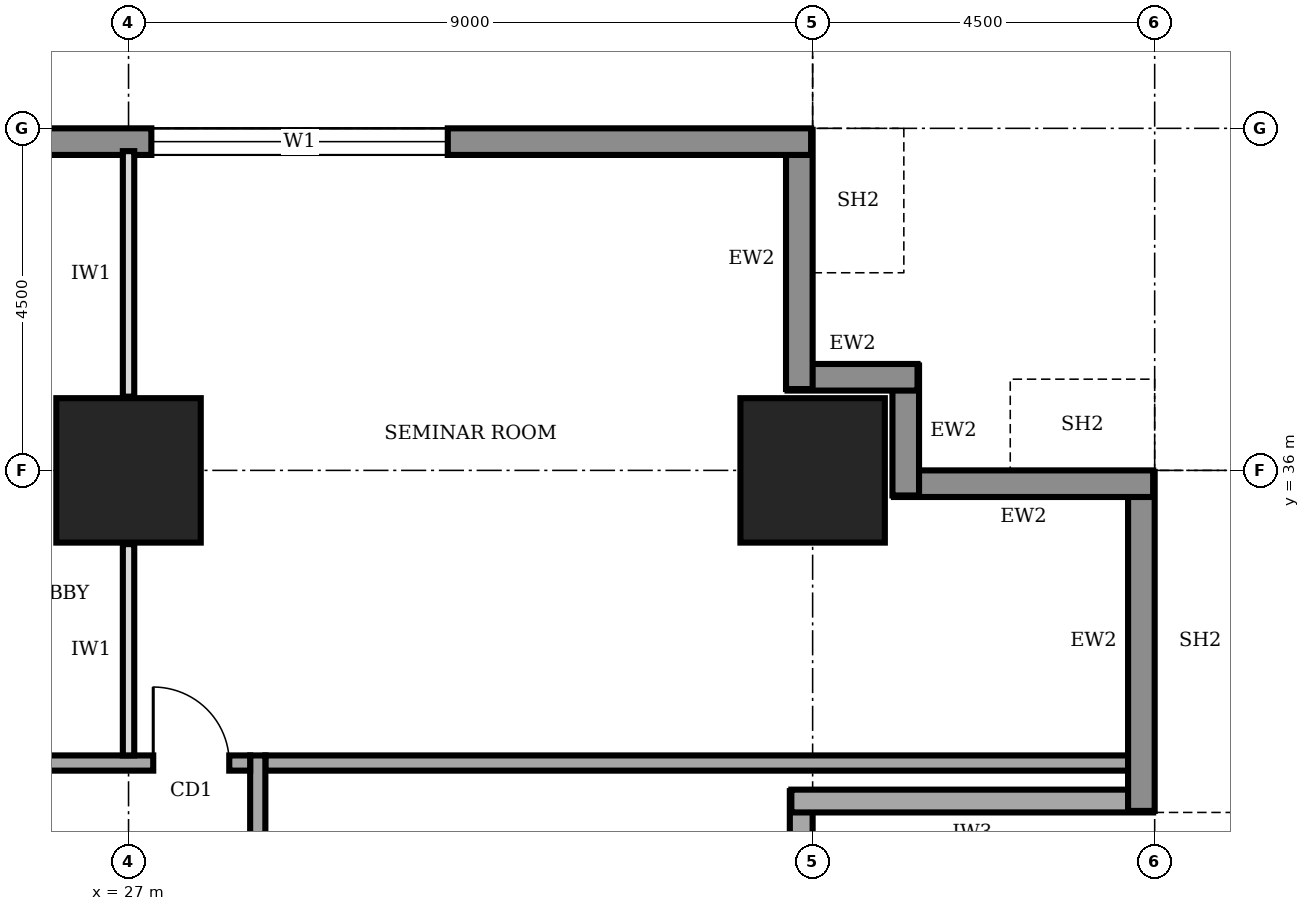
"""IFC4 building model, lengths in metres.
Left out: names, types, materials, properties, quantities, classifications, styles, units other than length and angle.
Written with IfcOpenShell. Run it as: python <this file> out.ifc"""

import sys

from ifc_helpers import new_model, si_unit, direction, frame, frame_2d, origin, origin_2d, place, context, subcontext, project, spatial, rectangle, extrude, element, fill, save


model = new_model("IFC4")
c1 = context("Model", 3, precision=1e-05, world=origin(), true_north=direction((0.0, 1.0)))
c2 = subcontext(c1, "Body", "Model", "MODEL_VIEW")
j1 = project(units=[si_unit("LENGTHUNIT", "METRE"), si_unit("PLANEANGLEUNIT", "RADIAN")], contexts=[c1])
p1 = place(None, origin())
s1 = spatial("IfcSite", under=j1, at=p1, CompositionType="ELEMENT")
p2 = place(p1, origin())
s2 = spatial("IfcBuilding", under=s1, at=p2, CompositionType="ELEMENT")
p3 = place(p2, frame((0.0, 0.0, 109.0)))
s3 = spatial("IfcBuildingStorey", under=s2, at=p3, CompositionType="ELEMENT", Elevation=109.0)
for number, where, z_axis, x_axis in (
    (1, (27.0, 36.0, 0.0), (0.0, 0.0, 1.0), (1.0, 0.0, 0.0)),
    (2, (36.0, 36.0, 0.0), (0.0, 0.0, 1.0), (1.0, 0.0, 0.0)),
):
    element("IfcColumn", number, at=place(p3, frame(where, z_axis=z_axis, x_axis=x_axis)), inside=s3, PredefinedType="COLUMN", context=c2, shape_type="SweptSolid", body=[
        extrude(rectangle(XDim=1.9, YDim=1.9, at=origin_2d()), origin(), (0.0, 0.0, 1.0), 4.0),
    ])
p4 = place(p3, frame((35.85, 30.4, 0.0), z_axis=(0.0, 0.0, 1.0), x_axis=(0.0, 1.0, 0.0)))
e3 = element("IfcWall", 3, at=p4, inside=s3, PredefinedType="SOLIDWALL", context=c2, shape_type="SweptSolid", body=[
    extrude(rectangle(XDim=1.38, YDim=0.3, at=frame_2d((0.69, 0.0))), origin(), (0.0, 0.0, 1.0), 2.65),
])
p5 = place(p3, frame((35.72, 31.65, 0.0), z_axis=(0.0, 0.0, 1.0), x_axis=(1.0, 0.0, 0.0)))
e4 = element("IfcWall", 4, at=p5, inside=s3, PredefinedType="SOLIDWALL", context=c2, shape_type="SweptSolid", body=[
    extrude(rectangle(XDim=4.76, YDim=0.3, at=frame_2d((2.38, 0.0))), origin(), (0.0, 0.0, 1.0), 3.75),
])
p6 = place(p3, frame((40.325, 31.52, 0.0), z_axis=(0.0, 0.0, 1.0), x_axis=(0.0, 1.0, 0.0)))
e5 = element("IfcWall", 5, at=p6, inside=s3, PredefinedType="STANDARD", context=c2, shape_type="SweptSolid", body=[
    extrude(rectangle(XDim=4.46, YDim=0.35, at=frame_2d((2.23, 0.0))), origin(), (0.0, 0.0, 1.0), 3.75),
])
p7 = place(p3, frame((40.48, 35.825, 0.0), z_axis=(0.0, 0.0, 1.0), x_axis=(-1.0, 0.0, 0.0)))
e6 = element("IfcWall", 6, at=p7, inside=s3, PredefinedType="STANDARD", context=c2, shape_type="SweptSolid", body=[
    extrude(rectangle(XDim=3.41, YDim=0.35, at=frame_2d((1.705, 0.0))), origin(), (0.0, 0.0, 1.0), 2.85),
])
for number, where, z_axis, x_axis in (
    (7, (37.225, 35.67, 0.0), (0.0, 0.0, 1.0), (0.0, 1.0, 0.0)),
    (8, (37.38, 37.225, 0.0), (0.0, 0.0, 1.0), (-1.0, 0.0, 0.0)),
):
    element("IfcWall", number, at=place(p3, frame(where, z_axis=z_axis, x_axis=x_axis)), inside=s3, PredefinedType="STANDARD", context=c2, shape_type="SweptSolid", body=[
        extrude(rectangle(XDim=1.71, YDim=0.35, at=frame_2d((0.855, 0.0))), origin(), (0.0, 0.0, 1.0), 3.75),
    ])
p8 = place(p3, frame((35.825, 37.07, 0.0), z_axis=(0.0, 0.0, 1.0), x_axis=(0.0, 1.0, 0.0)))
e9 = element("IfcWall", 9, at=p8, inside=s3, PredefinedType="STANDARD", context=c2, shape_type="SweptSolid", body=[
    extrude(rectangle(XDim=3.41, YDim=0.35, at=frame_2d((1.705, 0.0))), origin(), (0.0, 0.0, 1.0), 2.85),
])
p9 = place(p3, frame((35.98, 40.325, 0.0), z_axis=(0.0, 0.0, 1.0), x_axis=(-1.0, 0.0, 0.0)))
e10 = element("IfcWall", 10, at=p9, inside=s3, PredefinedType="STANDARD", context=c2, shape_type="SweptSolid", body=[
    extrude(rectangle(XDim=31.46, YDim=0.35, at=frame_2d((15.73, 0.0))), origin(), (0.0, 0.0, 1.0), 3.75),
])
p10 = place(p9, frame((27.21, 0.0, 0.9)))
e11 = element("IfcOpeningElement", 11, at=p10, cuts=e10, PredefinedType="OPENING", context=c2, shape_type="SweptSolid", body=[
    extrude(rectangle(XDim=3.9, YDim=2.2, at=frame_2d((1.95, 1.1))), frame((0.0, 0.185, 0.0), z_axis=(0.0, -1.0, 0.0), x_axis=(1.0, 0.0, 0.0)), (0.0, 0.0, 1.0), 0.37),
])
p11 = place(p9, frame((22.78, 0.0, 0.9)))
e12 = element("IfcOpeningElement", 12, at=p11, cuts=e10, PredefinedType="OPENING", context=c2, shape_type="SweptSolid", body=[
    extrude(rectangle(XDim=3.9, YDim=2.2, at=frame_2d((1.95, 1.1))), frame((0.0, 0.185, 0.0), z_axis=(0.0, -1.0, 0.0), x_axis=(1.0, 0.0, 0.0)), (0.0, 0.0, 1.0), 0.37),
])
p12 = place(p9, frame((4.78, 0.0, 0.9)))
e13 = element("IfcOpeningElement", 13, at=p12, cuts=e10, PredefinedType="OPENING", context=c2, shape_type="SweptSolid", body=[
    extrude(rectangle(XDim=3.9, YDim=2.2, at=frame_2d((1.95, 1.1))), frame((0.0, 0.185, 0.0), z_axis=(0.0, -1.0, 0.0), x_axis=(1.0, 0.0, 0.0)), (0.0, 0.0, 1.0), 0.37),
])
p13 = place(p3, frame((28.7, 8.45, 0.0), z_axis=(0.0, 0.0, 1.0), x_axis=(0.0, 1.0, 0.0)))
e14 = element("IfcWall", 14, at=p13, inside=s3, PredefinedType="SOLIDWALL", context=c2, shape_type="SweptSolid", body=[
    extrude(rectangle(XDim=23.8, YDim=0.2, at=frame_2d((11.9, 0.0))), origin(), (0.0, 0.0, 1.0), 3.75),
])
p14 = place(p13, frame((10.9, 0.0, 0.0)))
e15 = element("IfcOpeningElement", 15, at=p14, cuts=e14, PredefinedType="OPENING", context=c2, shape_type="SweptSolid", body=[
    extrude(rectangle(XDim=1.8, YDim=2.1, at=frame_2d((0.9, 1.05))), frame((0.0, 0.11, 0.0), z_axis=(0.0, -1.0, 0.0), x_axis=(1.0, 0.0, 0.0)), (0.0, 0.0, 1.0), 0.22),
])
p15 = place(p3, frame((28.6, 32.15, 0.0), z_axis=(0.0, 0.0, 1.0), x_axis=(-1.0, 0.0, 0.0)))
e16 = element("IfcWall", 16, at=p15, inside=s3, PredefinedType="SOLIDWALL", context=c2, shape_type="SweptSolid", body=[
    extrude(rectangle(XDim=16.9, YDim=0.2, at=frame_2d((8.45, 0.0))), origin(), (0.0, 0.0, 1.0), 3.75),
])
p16 = place(p15, frame((15.425, 0.0, 0.0)))
e17 = element("IfcOpeningElement", 17, at=p16, cuts=e16, PredefinedType="OPENING", context=c2, shape_type="SweptSolid", body=[
    extrude(rectangle(XDim=1.0, YDim=2.1, at=frame_2d((0.5, 1.05))), frame((0.0, 0.11, 0.0), z_axis=(0.0, -1.0, 0.0), x_axis=(1.0, 0.0, 0.0)), (0.0, 0.0, 1.0), 0.22),
])
p17 = place(p15, frame((12.35, 0.0, 0.0)))
e18 = element("IfcOpeningElement", 18, at=p17, cuts=e16, PredefinedType="OPENING", context=c2, shape_type="SweptSolid", body=[
    extrude(rectangle(XDim=1.0, YDim=2.1, at=frame_2d((0.5, 1.05))), frame((0.0, 0.11, 0.0), z_axis=(0.0, -1.0, 0.0), x_axis=(1.0, 0.0, 0.0)), (0.0, 0.0, 1.0), 0.22),
])
p18 = place(p15, frame((5.6, 0.0, 0.0)))
e19 = element("IfcOpeningElement", 19, at=p18, cuts=e16, PredefinedType="OPENING", context=c2, shape_type="SweptSolid", body=[
    extrude(rectangle(XDim=1.0, YDim=2.1, at=frame_2d((0.5, 1.05))), frame((0.0, 0.11, 0.0), z_axis=(0.0, -1.0, 0.0), x_axis=(1.0, 0.0, 0.0)), (0.0, 0.0, 1.0), 0.22),
])
p19 = place(p15, frame((0.275, 0.0, 0.0)))
e20 = element("IfcOpeningElement", 20, at=p19, cuts=e16, PredefinedType="OPENING", context=c2, shape_type="SweptSolid", body=[
    extrude(rectangle(XDim=1.0, YDim=2.1, at=frame_2d((0.5, 1.05))), frame((0.0, 0.11, 0.0), z_axis=(0.0, -1.0, 0.0), x_axis=(1.0, 0.0, 0.0)), (0.0, 0.0, 1.0), 0.22),
])
p20 = place(p3, frame((28.8, 32.15, 0.0), z_axis=(0.0, 0.0, 1.0), x_axis=(1.0, 0.0, 0.0)))
e21 = element("IfcWall", 21, at=p20, inside=s3, PredefinedType="SOLIDWALL", context=c2, shape_type="SweptSolid", body=[
    extrude(rectangle(XDim=11.4, YDim=0.2, at=frame_2d((5.7, 0.0))), origin(), (0.0, 0.0, 1.0), 3.75),
])
p21 = place(p3, frame((27.0, 32.25, 0.0), z_axis=(0.0, 0.0, 1.0), x_axis=(0.0, 1.0, 0.0)))
e22 = element("IfcWall", 22, at=p21, inside=s3, PredefinedType="PARTITIONING", context=c2, shape_type="SweptSolid", body=[
    extrude(rectangle(XDim=2.78, YDim=0.15, at=frame_2d((1.39, 0.0))), origin(), (0.0, 0.0, 1.0), 2.85),
])
p22 = place(p3, frame((27.0, 36.97, 0.0), z_axis=(0.0, 0.0, 1.0), x_axis=(0.0, 1.0, 0.0)))
e23 = element("IfcWall", 23, at=p22, inside=s3, PredefinedType="PARTITIONING", context=c2, shape_type="SweptSolid", body=[
    extrude(rectangle(XDim=3.23, YDim=0.15, at=frame_2d((1.615, 0.0))), origin(), (0.0, 0.0, 1.0), 2.85),
])
p23 = place(p12, origin())
e24 = element("IfcWindow", 24, at=p23, inside=s3, PartitioningType="SINGLE_PANEL", PredefinedType="WINDOW", context=c2, shape_type="SweptSolid", body=[
    extrude(rectangle(XDim=3.9, YDim=2.2, at=frame_2d((1.95, 1.1))), frame((0.0, 0.03, 0.0), z_axis=(0.0, -1.0, 0.0), x_axis=(1.0, 0.0, 0.0)), (0.0, 0.0, 1.0), 0.06),
])
fill(e13, e24)
p24 = place(p19, frame((1.0, 0.0, 0.0), z_axis=(0.0, 0.0, 1.0), x_axis=(-1.0, 0.0, 0.0)))
e25 = element("IfcDoor", 25, at=p24, inside=s3, OperationType="SINGLE_SWING_LEFT", PredefinedType="DOOR", context=c2, shape_type="SweptSolid", body=[
    extrude(rectangle(XDim=1.0, YDim=2.1, at=frame_2d((0.5, 1.05))), frame((0.0, 0.025, 0.0), z_axis=(0.0, -1.0, 0.0), x_axis=(1.0, 0.0, 0.0)), (0.0, 0.0, 1.0), 0.05),
])
fill(e20, e25)
save(model, sys.argv[1])
